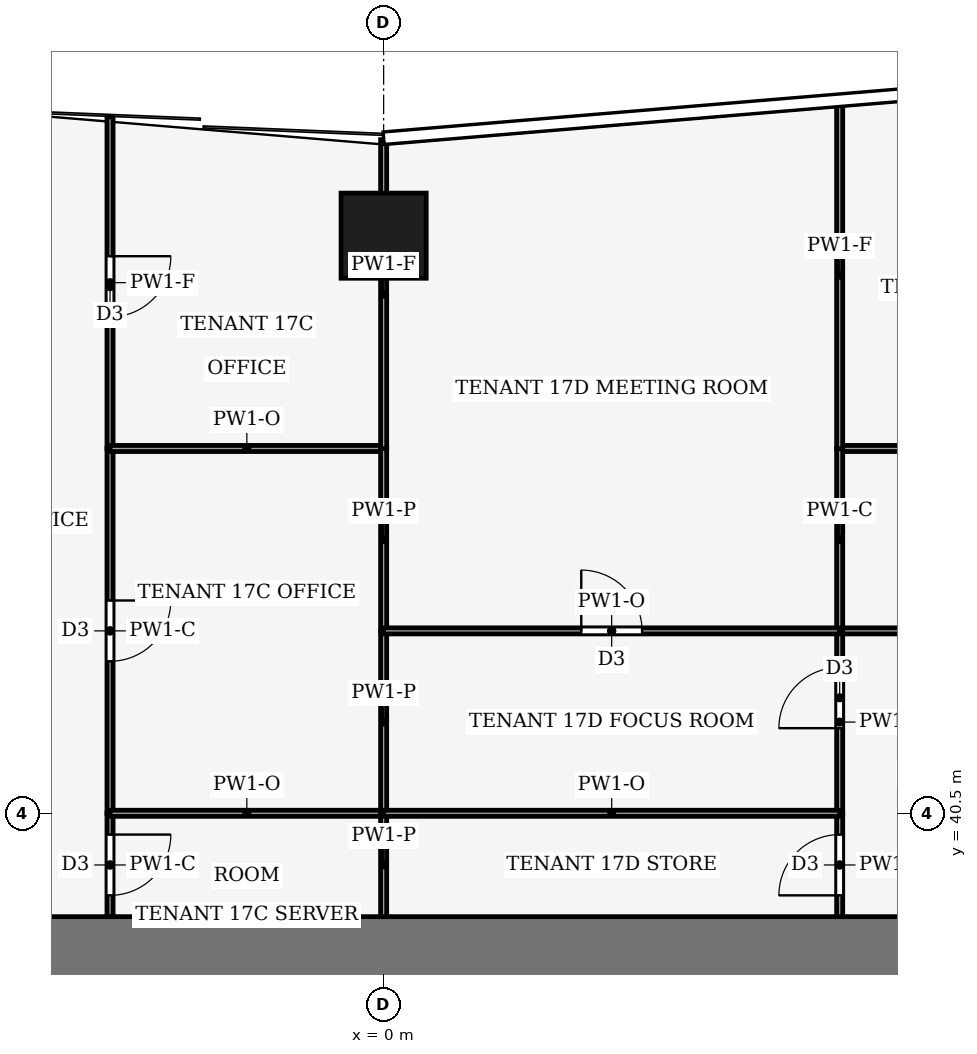
"""IFC4 building model, lengths in metres.
Left out: names, types, materials, properties, quantities, classifications, styles, units other than length and angle.
Written with IfcOpenShell. Run it as: python <this file> out.ifc"""

import sys

from ifc_helpers import new_model, si_unit, direction, frame, frame_2d, origin, origin_2d, place, context, subcontext, project, spatial, rectangle, hollow_rectangle, extrude, element, fill, save


model = new_model("IFC4")
c1 = context("Model", 3, precision=1e-05, world=origin(), true_north=direction((0.0, 1.0)))
c2 = subcontext(c1, "Body", "Model", "MODEL_VIEW")
j1 = project(units=[si_unit("LENGTHUNIT", "METRE"), si_unit("PLANEANGLEUNIT", "RADIAN")], contexts=[c1])
p1 = place(None, origin())
s1 = spatial("IfcSite", under=j1, at=p1, CompositionType="ELEMENT")
p2 = place(p1, origin())
s2 = spatial("IfcBuilding", under=s1, at=p2, CompositionType="ELEMENT")
p3 = place(p2, frame((0.0, 0.0, 78.0)))
s3 = spatial("IfcBuildingStorey", under=s2, at=p3, CompositionType="ELEMENT", Elevation=78.0)
p4 = place(p3, frame((-13.8, 38.2, -0.13), z_axis=(0.0, 0.0, 1.0), x_axis=(1.0, 0.0, 0.0)))
e1 = element("IfcWall", 1, at=p4, inside=s3, PredefinedType="SHEAR", context=c2, shape_type="SweptSolid", body=[
    extrude(rectangle(XDim=27.6, YDim=1.2, at=frame_2d((13.8, 0.0))), origin(), (0.0, 0.0, 1.0), 4.0),
])
p5 = place(p3, frame((0.0, 50.0, 0.0), z_axis=(0.0, 0.0, 1.0), x_axis=(1.0, 0.0, 0.0)))
e2 = element("IfcColumn", 2, at=p5, inside=s3, PredefinedType="COLUMN", context=c2, shape_type="SweptSolid", body=[
    extrude(hollow_rectangle(XDim=1.4, YDim=1.4, WallThickness=0.08, at=origin_2d()), origin(), (0.0, 0.0, 1.0), 4.0),
])
p6 = place(p3, frame((-4.5, 40.5, 0.0), z_axis=(0.0, 0.0, 1.0), x_axis=(0.0, -1.0, 0.0)))
e3 = element("IfcWall", 3, at=p6, inside=s3, PredefinedType="PARTITIONING", context=c2, shape_type="SweptSolid", body=[
    extrude(rectangle(XDim=1.7, YDim=0.1, at=frame_2d((0.85, 0.0))), origin(), (0.0, 0.0, 1.0), 3.87),
])
p7 = place(p6, frame((0.35, 0.0, 0.0)))
e4 = element("IfcOpeningElement", 4, at=p7, cuts=e3, PredefinedType="OPENING", context=c2, shape_type="SweptSolid", body=[
    extrude(rectangle(XDim=1.0, YDim=2.1, at=frame_2d((0.5, 1.05))), frame((0.0, 0.06, 0.0), z_axis=(0.0, -1.0, 0.0), x_axis=(1.0, 0.0, 0.0)), (0.0, 0.0, 1.0), 0.12),
])
p8 = place(p3, frame((-4.5, 46.5, 0.0), z_axis=(0.0, 0.0, 1.0), x_axis=(0.0, -1.0, 0.0)))
e5 = element("IfcWall", 5, at=p8, inside=s3, PredefinedType="PARTITIONING", context=c2, shape_type="SweptSolid", body=[
    extrude(rectangle(XDim=6.0, YDim=0.1, at=frame_2d((3.0, 0.0))), origin(), (0.0, 0.0, 1.0), 3.87),
])
p9 = place(p8, frame((2.5, 0.0, 0.0)))
e6 = element("IfcOpeningElement", 6, at=p9, cuts=e5, PredefinedType="OPENING", context=c2, shape_type="SweptSolid", body=[
    extrude(rectangle(XDim=1.0, YDim=2.1, at=frame_2d((0.5, 1.05))), frame((0.0, 0.06, 0.0), z_axis=(0.0, -1.0, 0.0), x_axis=(1.0, 0.0, 0.0)), (0.0, 0.0, 1.0), 0.12),
])
p10 = place(p3, frame((-4.5, 51.955, 0.0), z_axis=(0.0, 0.0, 1.0), x_axis=(0.0, -1.0, 0.0)))
e7 = element("IfcWall", 7, at=p10, inside=s3, PredefinedType="PARTITIONING", context=c2, shape_type="SweptSolid", body=[
    extrude(rectangle(XDim=5.455, YDim=0.1, at=frame_2d((2.728, 0.0))), origin(), (0.0, 0.0, 1.0), 3.04),
])
p11 = place(p10, frame((2.292, 0.0, 0.0)))
e8 = element("IfcOpeningElement", 8, at=p11, cuts=e7, PredefinedType="OPENING", context=c2, shape_type="SweptSolid", body=[
    extrude(rectangle(XDim=1.0, YDim=2.1, at=frame_2d((0.5, 1.05))), frame((0.0, 0.06, 0.0), z_axis=(0.0, -1.0, 0.0), x_axis=(1.0, 0.0, 0.0)), (0.0, 0.0, 1.0), 0.12),
])
p12 = place(p3, frame((0.0, 40.5, 0.0), z_axis=(0.0, 0.0, 1.0), x_axis=(-1.0, 0.0, 0.0)))
e9 = element("IfcWall", 9, at=p12, inside=s3, PredefinedType="PARTITIONING", context=c2, shape_type="SweptSolid", body=[
    extrude(rectangle(XDim=4.5, YDim=0.1, at=frame_2d((2.25, 0.0))), origin(), (0.0, 0.0, 1.0), 3.39),
])
p13 = place(p3, frame((0.0, 38.8, 0.0), z_axis=(0.0, 0.0, 1.0), x_axis=(0.0, 1.0, 0.0)))
e10 = element("IfcWall", 10, at=p13, inside=s3, PredefinedType="PARTITIONING", context=c2, shape_type="SweptSolid", body=[
    extrude(rectangle(XDim=1.7, YDim=0.1, at=frame_2d((0.85, 0.0))), origin(), (0.0, 0.0, 1.0), 3.44),
])
p14 = place(p3, frame((0.0, 46.5, 0.0), z_axis=(0.0, 0.0, 1.0), x_axis=(-1.0, 0.0, 0.0)))
e11 = element("IfcWall", 11, at=p14, inside=s3, PredefinedType="PARTITIONING", context=c2, shape_type="SweptSolid", body=[
    extrude(rectangle(XDim=4.5, YDim=0.1, at=frame_2d((2.25, 0.0))), origin(), (0.0, 0.0, 1.0), 3.39),
])
p15 = place(p3, frame((0.0, 40.5, 0.0), z_axis=(0.0, 0.0, 1.0), x_axis=(0.0, 1.0, 0.0)))
e12 = element("IfcWall", 12, at=p15, inside=s3, PredefinedType="PARTITIONING", context=c2, shape_type="SweptSolid", body=[
    extrude(rectangle(XDim=3.0, YDim=0.1, at=frame_2d((1.5, 0.0))), origin(), (0.0, 0.0, 1.0), 3.44),
])
p16 = place(p3, frame((0.0, 43.5, 0.0), z_axis=(0.0, 0.0, 1.0), x_axis=(0.0, 1.0, 0.0)))
e13 = element("IfcWall", 13, at=p16, inside=s3, PredefinedType="PARTITIONING", context=c2, shape_type="SweptSolid", body=[
    extrude(rectangle(XDim=3.004, YDim=0.1, at=frame_2d((1.502, 0.0))), origin(), (0.0, 0.0, 1.0), 3.44),
])
p17 = place(p3, frame((0.0, 46.496, 0.0), z_axis=(0.0, 0.0, 1.0), x_axis=(0.0, 1.0, 0.0)))
e14 = element("IfcWall", 14, at=p17, inside=s3, PredefinedType="PARTITIONING", context=c2, shape_type="SweptSolid", body=[
    extrude(rectangle(XDim=5.084, YDim=0.1, at=frame_2d((2.542, 0.0))), origin(), (0.0, 0.0, 1.0), 3.04),
])
p18 = place(p3, frame((7.5, 43.5, 0.0), z_axis=(0.0, 0.0, 1.0), x_axis=(1.0, 0.0, 0.0)))
e15 = element("IfcWall", 15, at=p18, inside=s3, PredefinedType="PARTITIONING", context=c2, shape_type="SweptSolid", body=[
    extrude(rectangle(XDim=6.3, YDim=0.1, at=frame_2d((3.15, 0.0))), origin(), (0.0, 0.0, 1.0), 3.39),
])
p19 = place(p18, frame((2.65, 0.0, 0.0)))
e16 = element("IfcOpeningElement", 16, at=p19, cuts=e15, PredefinedType="OPENING", context=c2, shape_type="SweptSolid", body=[
    extrude(rectangle(XDim=1.0, YDim=2.1, at=frame_2d((0.5, 1.05))), frame((0.0, 0.06, 0.0), z_axis=(0.0, -1.0, 0.0), x_axis=(1.0, 0.0, 0.0)), (0.0, 0.0, 1.0), 0.12),
])
p20 = place(p3, frame((7.5, 38.8, 0.0), z_axis=(0.0, 0.0, 1.0), x_axis=(0.0, 1.0, 0.0)))
e17 = element("IfcWall", 17, at=p20, inside=s3, PredefinedType="PARTITIONING", context=c2, shape_type="SweptSolid", body=[
    extrude(rectangle(XDim=1.7, YDim=0.1, at=frame_2d((0.85, 0.0))), origin(), (0.0, 0.0, 1.0), 3.87),
])
p21 = place(p20, frame((0.35, 0.0, 0.0)))
e18 = element("IfcOpeningElement", 18, at=p21, cuts=e17, PredefinedType="OPENING", context=c2, shape_type="SweptSolid", body=[
    extrude(rectangle(XDim=1.0, YDim=2.1, at=frame_2d((0.5, 1.05))), frame((0.0, 0.06, 0.0), z_axis=(0.0, -1.0, 0.0), x_axis=(1.0, 0.0, 0.0)), (0.0, 0.0, 1.0), 0.12),
])
p22 = place(p3, frame((7.5, 40.5, 0.0), z_axis=(0.0, 0.0, 1.0), x_axis=(0.0, 1.0, 0.0)))
e19 = element("IfcWall", 19, at=p22, inside=s3, PredefinedType="PARTITIONING", context=c2, shape_type="SweptSolid", body=[
    extrude(rectangle(XDim=3.0, YDim=0.1, at=frame_2d((1.5, 0.0))), origin(), (0.0, 0.0, 1.0), 3.87),
])
p23 = place(p22, frame((1.4, 0.0, 0.0)))
e20 = element("IfcOpeningElement", 20, at=p23, cuts=e19, PredefinedType="OPENING", context=c2, shape_type="SweptSolid", body=[
    extrude(rectangle(XDim=1.0, YDim=2.1, at=frame_2d((0.5, 1.05))), frame((0.0, 0.06, 0.0), z_axis=(0.0, -1.0, 0.0), x_axis=(1.0, 0.0, 0.0)), (0.0, 0.0, 1.0), 0.12),
])
p24 = place(p3, frame((13.8, 46.5, 0.0), z_axis=(0.0, 0.0, 1.0), x_axis=(-1.0, 0.0, 0.0)))
e21 = element("IfcWall", 21, at=p24, inside=s3, PredefinedType="PARTITIONING", context=c2, shape_type="SweptSolid", body=[
    extrude(rectangle(XDim=6.3, YDim=0.1, at=frame_2d((3.15, 0.0))), origin(), (0.0, 0.0, 1.0), 3.39),
])
p25 = place(p3, frame((7.5, 46.504, 0.0), z_axis=(0.0, 0.0, 1.0), x_axis=(0.0, -1.0, 0.0)))
e22 = element("IfcWall", 22, at=p25, inside=s3, PredefinedType="PARTITIONING", context=c2, shape_type="SweptSolid", body=[
    extrude(rectangle(XDim=3.004, YDim=0.1, at=frame_2d((1.502, 0.0))), origin(), (0.0, 0.0, 1.0), 3.87),
])
p26 = place(p3, frame((7.5, 52.205, 0.0), z_axis=(0.0, 0.0, 1.0), x_axis=(0.0, -1.0, 0.0)))
e23 = element("IfcWall", 23, at=p26, inside=s3, PredefinedType="PARTITIONING", context=c2, shape_type="SweptSolid", body=[
    extrude(rectangle(XDim=5.709, YDim=0.1, at=frame_2d((2.854, 0.0))), origin(), (0.0, 0.0, 1.0), 3.04),
])
p27 = place(p3, frame((7.5, 40.5, 0.0), z_axis=(0.0, 0.0, 1.0), x_axis=(-1.0, 0.0, 0.0)))
e24 = element("IfcWall", 24, at=p27, inside=s3, PredefinedType="PARTITIONING", context=c2, shape_type="SweptSolid", body=[
    extrude(rectangle(XDim=7.5, YDim=0.1, at=frame_2d((3.75, 0.0))), origin(), (0.0, 0.0, 1.0), 3.39),
])
p28 = place(p3, frame((0.0, 43.5, 0.0), z_axis=(0.0, 0.0, 1.0), x_axis=(1.0, 0.0, 0.0)))
e25 = element("IfcWall", 25, at=p28, inside=s3, PredefinedType="PARTITIONING", context=c2, shape_type="SweptSolid", body=[
    extrude(rectangle(XDim=7.5, YDim=0.1, at=frame_2d((3.75, 0.0))), origin(), (0.0, 0.0, 1.0), 3.39),
])
p29 = place(p28, frame((3.25, 0.0, 0.0)))
e26 = element("IfcOpeningElement", 26, at=p29, cuts=e25, PredefinedType="OPENING", context=c2, shape_type="SweptSolid", body=[
    extrude(rectangle(XDim=1.0, YDim=2.1, at=frame_2d((0.5, 1.05))), frame((0.0, 0.06, 0.0), z_axis=(0.0, -1.0, 0.0), x_axis=(1.0, 0.0, 0.0)), (0.0, 0.0, 1.0), 0.12),
])
p30 = place(p7, origin())
e27 = element("IfcDoor", 27, at=p30, inside=s3, OperationType="SINGLE_SWING_LEFT", PredefinedType="DOOR", context=c2, shape_type="SweptSolid", body=[
    extrude(rectangle(XDim=1.0, YDim=2.1, at=frame_2d((0.5, 1.05))), frame((0.0, 0.025, 0.0), z_axis=(0.0, -1.0, 0.0), x_axis=(1.0, 0.0, 0.0)), (0.0, 0.0, 1.0), 0.05),
])
fill(e4, e27)
p31 = place(p9, origin())
e28 = element("IfcDoor", 28, at=p31, inside=s3, OperationType="SINGLE_SWING_RIGHT", PredefinedType="DOOR", context=c2, shape_type="SweptSolid", body=[
    extrude(rectangle(XDim=1.0, YDim=2.1, at=frame_2d((0.5, 1.05))), frame((0.0, 0.025, 0.0), z_axis=(0.0, -1.0, 0.0), x_axis=(1.0, 0.0, 0.0)), (0.0, 0.0, 1.0), 0.05),
])
fill(e6, e28)
p32 = place(p11, origin())
e29 = element("IfcDoor", 29, at=p32, inside=s3, OperationType="SINGLE_SWING_RIGHT", PredefinedType="DOOR", context=c2, shape_type="SweptSolid", body=[
    extrude(rectangle(XDim=1.0, YDim=2.1, at=frame_2d((0.5, 1.05))), frame((0.0, 0.025, 0.0), z_axis=(0.0, -1.0, 0.0), x_axis=(1.0, 0.0, 0.0)), (0.0, 0.0, 1.0), 0.05),
])
fill(e8, e29)
p33 = place(p21, origin())
e30 = element("IfcDoor", 30, at=p33, inside=s3, OperationType="SINGLE_SWING_LEFT", PredefinedType="DOOR", context=c2, shape_type="SweptSolid", body=[
    extrude(rectangle(XDim=1.0, YDim=2.1, at=frame_2d((0.5, 1.05))), frame((0.0, 0.025, 0.0), z_axis=(0.0, -1.0, 0.0), x_axis=(1.0, 0.0, 0.0)), (0.0, 0.0, 1.0), 0.05),
])
fill(e18, e30)
p34 = place(p23, origin())
e31 = element("IfcDoor", 31, at=p34, inside=s3, OperationType="SINGLE_SWING_RIGHT", PredefinedType="DOOR", context=c2, shape_type="SweptSolid", body=[
    extrude(rectangle(XDim=1.0, YDim=2.1, at=frame_2d((0.5, 1.05))), frame((0.0, 0.025, 0.0), z_axis=(0.0, -1.0, 0.0), x_axis=(1.0, 0.0, 0.0)), (0.0, 0.0, 1.0), 0.05),
])
fill(e20, e31)
p35 = place(p29, origin())
e32 = element("IfcDoor", 32, at=p35, inside=s3, OperationType="SINGLE_SWING_LEFT", PredefinedType="DOOR", context=c2, shape_type="SweptSolid", body=[
    extrude(rectangle(XDim=1.0, YDim=2.1, at=frame_2d((0.5, 1.05))), frame((0.0, 0.025, 0.0), z_axis=(0.0, -1.0, 0.0), x_axis=(1.0, 0.0, 0.0)), (0.0, 0.0, 1.0), 0.05),
])
fill(e26, e32)
save(model, sys.argv[1])
